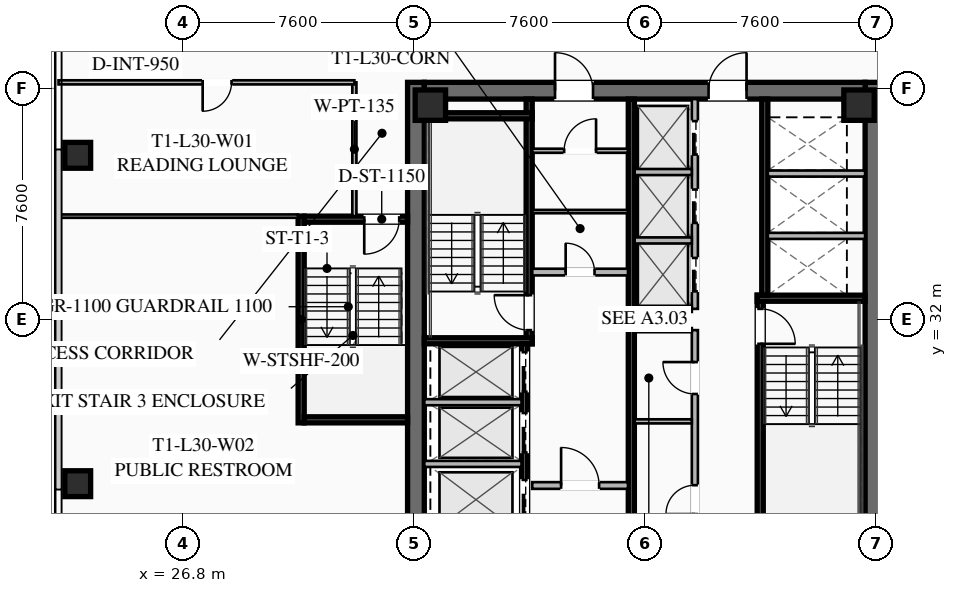
"""IFC4 building model, lengths in metres.
Left out: names, types, materials, properties, quantities, classifications, styles, units other than length and angle.
Written with IfcOpenShell. Run it as: python <this file> out.ifc"""

import sys

from ifc_helpers import new_model, si_unit, direction, frame, frame_2d, origin, origin_2d, place, context, subcontext, project, spatial, rectangle, hollow_rectangle, extrude, element, fill, save


model = new_model("IFC4")
c1 = context("Model", 3, precision=1e-05, world=origin(), true_north=direction((0.0, 1.0)))
c2 = subcontext(c1, "Body", "Model", "MODEL_VIEW")
j1 = project(units=[si_unit("LENGTHUNIT", "METRE"), si_unit("PLANEANGLEUNIT", "RADIAN")], contexts=[c1])
p1 = place(None, origin())
s1 = spatial("IfcSite", under=j1, at=p1, CompositionType="ELEMENT")
p2 = place(p1, origin())
s2 = spatial("IfcBuilding", under=s1, at=p2, CompositionType="ELEMENT")
p3 = place(p2, frame((0.0, 0.0, 114.4)))
s3 = spatial("IfcBuildingStorey", under=s2, at=p3, CompositionType="ELEMENT", Elevation=114.4)
for number, where, z_axis, x_axis in (
    (1, (34.475, 24.2, 0.0), (0.0, 0.0, 1.0), (0.0, 1.0, 0.0)),
    (2, (49.525, 39.8, 0.0), (0.0, 0.0, 1.0), (0.0, -1.0, 0.0)),
):
    element("IfcWall", number, at=place(p3, frame(where, z_axis=z_axis, x_axis=x_axis)), inside=s3, PredefinedType="SHEAR", context=c2, shape_type="SweptSolid", body=[
        extrude(rectangle(XDim=15.6, YDim=0.55, at=frame_2d((7.8, 0.0))), origin(), (0.0, 0.0, 1.0), 3.55),
    ])
p4 = place(p3, frame((34.75, 39.525, 0.0), z_axis=(0.0, 0.0, 1.0), x_axis=(1.0, 0.0, 0.0)))
e3 = element("IfcWall", 3, at=p4, inside=s3, PredefinedType="SHEAR", context=c2, shape_type="SweptSolid", body=[
    extrude(rectangle(XDim=14.5, YDim=0.55, at=frame_2d((7.25, 0.0))), origin(), (0.0, 0.0, 1.0), 3.55),
])
p5 = place(p4, frame((4.3, 0.0, 0.0)))
e4 = element("IfcOpeningElement", 4, at=p5, cuts=e3, PredefinedType="OPENING", context=c2, shape_type="SweptSolid", body=[
    extrude(rectangle(XDim=1.25, YDim=2.25, at=frame_2d((0.625, 1.125))), frame((0.0, 0.285, 0.0), z_axis=(0.0, -1.0, 0.0), x_axis=(1.0, 0.0, 0.0)), (0.0, 0.0, 1.0), 0.57),
])
p6 = place(p4, frame((9.35, 0.0, 0.0)))
e5 = element("IfcOpeningElement", 5, at=p6, cuts=e3, PredefinedType="OPENING", context=c2, shape_type="SweptSolid", body=[
    extrude(rectangle(XDim=1.25, YDim=2.25, at=frame_2d((0.625, 1.125))), frame((0.0, 0.285, 0.0), z_axis=(0.0, -1.0, 0.0), x_axis=(1.0, 0.0, 0.0)), (0.0, 0.0, 1.0), 0.57),
])
for number, where, z_axis, x_axis in (
    (6, (49.05, 39.05, 0.0), (0.0, 0.0, 1.0), (1.0, 0.0, 0.0)),
    (7, (34.95, 39.05, 0.0), (0.0, 0.0, 1.0), (1.0, 0.0, 0.0)),
):
    element("IfcColumn", number, at=place(p3, frame(where, z_axis=z_axis, x_axis=x_axis)), inside=s3, PredefinedType="COLUMN", context=c2, shape_type="SweptSolid", body=[
        extrude(hollow_rectangle(XDim=1.0, YDim=1.0, WallThickness=0.04, at=origin_2d()), origin(), (0.0, 0.0, 1.0), 3.37),
    ])
for number, where, z_axis, x_axis in (
    (8, (23.35, 37.4, 0.0), (0.0, 0.0, 1.0), (1.0, 0.0, 0.0)),
    (9, (23.35, 26.6, 0.0), (0.0, 0.0, 1.0), (1.0, 0.0, 0.0)),
):
    element("IfcColumn", number, at=place(p3, frame(where, z_axis=z_axis, x_axis=x_axis)), inside=s3, PredefinedType="COLUMN", context=c2, shape_type="SweptSolid", body=[
        extrude(hollow_rectangle(XDim=0.85, YDim=0.85, WallThickness=0.035, at=origin_2d()), origin(), (0.0, 0.0, 1.0), 3.37),
    ])
p7 = place(p3, frame((38.2, 31.2, 0.0), z_axis=(0.0, 0.0, 1.0), x_axis=(0.0, 1.0, 0.0)))
e10 = element("IfcWall", 10, at=p7, inside=s3, PredefinedType="SHEAR", context=c2, shape_type="SweptSolid", body=[
    extrude(rectangle(XDim=8.05, YDim=0.2, at=frame_2d((4.025, 0.0))), origin(), (0.0, 0.0, 1.0), 3.37),
])
p8 = place(p7, frame((0.45, 0.0, 0.0)))
e11 = element("IfcOpeningElement", 11, at=p8, cuts=e10, PredefinedType="OPENING", context=c2, shape_type="SweptSolid", body=[
    extrude(rectangle(XDim=1.15, YDim=2.2, at=frame_2d((0.575, 1.1))), frame((0.0, 0.11, 0.0), z_axis=(0.0, -1.0, 0.0), x_axis=(1.0, 0.0, 0.0)), (0.0, 0.0, 1.0), 0.22),
])
for number, where, z_axis, x_axis in (
    (12, (34.75, 31.3, 0.0), (0.0, 0.0, 1.0), (1.0, 0.0, 0.0)),
    (13, (34.75, 38.7, 0.0), (0.0, 0.0, 1.0), (1.0, 0.0, 0.0)),
):
    element("IfcWall", number, at=place(p3, frame(where, z_axis=z_axis, x_axis=x_axis)), inside=s3, PredefinedType="SHEAR", context=c2, shape_type="SweptSolid", body=[
        extrude(rectangle(XDim=3.55, YDim=0.2, at=frame_2d((1.775, 0.0))), origin(), (0.0, 0.0, 1.0), 3.37),
    ])
p9 = place(p3, frame((45.8, 32.8, 0.0), z_axis=(0.0, 0.0, 1.0), x_axis=(0.0, -1.0, 0.0)))
e14 = element("IfcWall", 14, at=p9, inside=s3, PredefinedType="SHEAR", context=c2, shape_type="SweptSolid", body=[
    extrude(rectangle(XDim=8.05, YDim=0.2, at=frame_2d((4.025, 0.0))), origin(), (0.0, 0.0, 1.0), 3.37),
])
p10 = place(p9, frame((0.45, 0.0, 0.0)))
e15 = element("IfcOpeningElement", 15, at=p10, cuts=e14, PredefinedType="OPENING", context=c2, shape_type="SweptSolid", body=[
    extrude(rectangle(XDim=1.15, YDim=2.2, at=frame_2d((0.575, 1.1))), frame((0.0, 0.11, 0.0), z_axis=(0.0, -1.0, 0.0), x_axis=(1.0, 0.0, 0.0)), (0.0, 0.0, 1.0), 0.22),
])
p11 = place(p3, frame((45.7, 32.7, 0.0), z_axis=(0.0, 0.0, 1.0), x_axis=(1.0, 0.0, 0.0)))
e16 = element("IfcWall", 16, at=p11, inside=s3, PredefinedType="SHEAR", context=c2, shape_type="SweptSolid", body=[
    extrude(rectangle(XDim=3.55, YDim=0.2, at=frame_2d((1.775, 0.0))), origin(), (0.0, 0.0, 1.0), 3.37),
])
p12 = place(p3, frame((41.56, 24.75, 0.0), z_axis=(0.0, 0.0, 1.0), x_axis=(0.0, 1.0, 0.0)))
e17 = element("IfcWall", 17, at=p12, inside=s3, PredefinedType="SHEAR", context=c2, shape_type="SweptSolid", body=[
    extrude(rectangle(XDim=14.5, YDim=0.2, at=frame_2d((7.25, 0.0))), origin(), (0.0, 0.0, 1.0), 3.37),
])
p13 = place(p3, frame((38.3, 33.56, 0.0), z_axis=(0.0, 0.0, 1.0), x_axis=(1.0, 0.0, 0.0)))
e18 = element("IfcWall", 18, at=p13, inside=s3, PredefinedType="SOLIDWALL", context=c2, shape_type="SweptSolid", body=[
    extrude(rectangle(XDim=3.15, YDim=0.22, at=frame_2d((1.575, 0.0))), origin(), (0.0, 0.0, 1.0), 2.723),
])
p14 = place(p13, frame((1.1, 0.0, 0.0)))
e19 = element("IfcOpeningElement", 19, at=p14, cuts=e18, PredefinedType="OPENING", context=c2, shape_type="SweptSolid", body=[
    extrude(rectangle(XDim=0.95, YDim=2.05, at=frame_2d((0.475, 1.025))), frame((0.0, 0.12, 0.0), z_axis=(0.0, -1.0, 0.0), x_axis=(1.0, 0.0, 0.0)), (0.0, 0.0, 1.0), 0.24),
])
p15 = place(p3, frame((38.3, 26.54, 0.0), z_axis=(0.0, 0.0, 1.0), x_axis=(1.0, 0.0, 0.0)))
e20 = element("IfcWall", 20, at=p15, inside=s3, PredefinedType="SOLIDWALL", context=c2, shape_type="SweptSolid", body=[
    extrude(rectangle(XDim=3.15, YDim=0.22, at=frame_2d((1.575, 0.0))), origin(), (0.0, 0.0, 1.0), 2.723),
])
p16 = place(p15, frame((0.95, 0.0, 0.0)))
e21 = element("IfcOpeningElement", 21, at=p16, cuts=e20, PredefinedType="OPENING", context=c2, shape_type="SweptSolid", body=[
    extrude(rectangle(XDim=1.25, YDim=2.25, at=frame_2d((0.625, 1.125))), frame((0.0, 0.12, 0.0), z_axis=(0.0, -1.0, 0.0), x_axis=(1.0, 0.0, 0.0)), (0.0, 0.0, 1.0), 0.24),
])
p17 = place(p3, frame((38.05, 24.75, 0.0), z_axis=(0.0, 0.0, 1.0), x_axis=(0.0, 1.0, 0.0)))
e22 = element("IfcWall", 22, at=p17, inside=s3, PredefinedType="SHEAR", context=c2, shape_type="SweptSolid", body=[
    extrude(rectangle(XDim=6.45, YDim=0.2, at=frame_2d((3.225, 0.0))), origin(), (0.0, 0.0, 1.0), 3.37),
])
p18 = place(p17, frame((4.875, 0.0, 0.0)))
e23 = element("IfcOpeningElement", 23, at=p18, cuts=e22, PredefinedType="OPENING", context=c2, shape_type="SweptSolid", body=[
    extrude(rectangle(XDim=1.3, YDim=2.25, at=frame_2d((0.65, 1.125))), frame((0.0, 0.11, 0.0), z_axis=(0.0, -1.0, 0.0), x_axis=(1.0, 0.0, 0.0)), (0.0, 0.0, 1.0), 0.22),
])
p19 = place(p17, frame((2.875, 0.0, 0.0)))
e24 = element("IfcOpeningElement", 24, at=p19, cuts=e22, PredefinedType="OPENING", context=c2, shape_type="SweptSolid", body=[
    extrude(rectangle(XDim=1.3, YDim=2.25, at=frame_2d((0.65, 1.125))), frame((0.0, 0.11, 0.0), z_axis=(0.0, -1.0, 0.0), x_axis=(1.0, 0.0, 0.0)), (0.0, 0.0, 1.0), 0.22),
])
p20 = place(p17, frame((0.675, 0.0, 0.0)))
e25 = element("IfcOpeningElement", 25, at=p20, cuts=e22, PredefinedType="OPENING", context=c2, shape_type="SweptSolid", body=[
    extrude(rectangle(XDim=1.3, YDim=2.25, at=frame_2d((0.65, 1.125))), frame((0.0, 0.11, 0.0), z_axis=(0.0, -1.0, 0.0), x_axis=(1.0, 0.0, 0.0)), (0.0, 0.0, 1.0), 0.22),
])
for number, where, z_axis, x_axis in (
    (26, (34.75, 27.25, 0.0), (0.0, 0.0, 1.0), (1.0, 0.0, 0.0)),
    (27, (34.75, 29.28, 0.0), (0.0, 0.0, 1.0), (1.0, 0.0, 0.0)),
):
    element("IfcWall", number, at=place(p3, frame(where, z_axis=z_axis, x_axis=x_axis)), inside=s3, PredefinedType="SOLIDWALL", context=c2, shape_type="SweptSolid", body=[
        extrude(rectangle(XDim=3.2, YDim=0.2, at=frame_2d((1.6, 0.0))), origin(), (0.0, 0.0, 1.0), 3.37),
    ])
p21 = place(p3, frame((45.95, 39.25, 0.0), z_axis=(0.0, 0.0, 1.0), x_axis=(0.0, -1.0, 0.0)))
e28 = element("IfcWall", 28, at=p21, inside=s3, PredefinedType="SHEAR", context=c2, shape_type="SweptSolid", body=[
    extrude(rectangle(XDim=6.45, YDim=0.2, at=frame_2d((3.225, 0.0))), origin(), (0.0, 0.0, 1.0), 3.37),
])
for number, where, z_axis, x_axis in (
    (29, (46.05, 34.75, 0.0), (0.0, 0.0, 1.0), (1.0, 0.0, 0.0)),
    (30, (46.05, 36.8, 0.0), (0.0, 0.0, 1.0), (1.0, 0.0, 0.0)),
):
    element("IfcWall", number, at=place(p3, frame(where, z_axis=z_axis, x_axis=x_axis)), inside=s3, PredefinedType="SOLIDWALL", context=c2, shape_type="SweptSolid", body=[
        extrude(rectangle(XDim=3.2, YDim=0.2, at=frame_2d((1.6, 0.0))), origin(), (0.0, 0.0, 1.0), 3.37),
    ])
p22 = place(p3, frame((38.3, 37.55, 0.0), z_axis=(0.0, 0.0, 1.0), x_axis=(1.0, 0.0, 0.0)))
e31 = element("IfcWall", 31, at=p22, inside=s3, PredefinedType="PARTITIONING", context=c2, shape_type="SweptSolid", body=[
    extrude(rectangle(XDim=3.15, YDim=0.135, at=frame_2d((1.575, 0.0))), origin(), (0.0, 0.0, 1.0), 2.723),
])
p23 = place(p22, frame((1.05, 0.0, 0.0)))
e32 = element("IfcOpeningElement", 32, at=p23, cuts=e31, PredefinedType="OPENING", context=c2, shape_type="SweptSolid", body=[
    extrude(rectangle(XDim=1.05, YDim=2.2, at=frame_2d((0.525, 1.1))), frame((0.0, 0.077, 0.0), z_axis=(0.0, -1.0, 0.0), x_axis=(1.0, 0.0, 0.0)), (0.0, 0.0, 1.0), 0.155),
])
p24 = place(p3, frame((38.3, 35.55, 0.0), z_axis=(0.0, 0.0, 1.0), x_axis=(1.0, 0.0, 0.0)))
e33 = element("IfcWall", 33, at=p24, inside=s3, PredefinedType="PARTITIONING", context=c2, shape_type="SweptSolid", body=[
    extrude(rectangle(XDim=3.15, YDim=0.11, at=frame_2d((1.575, 0.0))), origin(), (0.0, 0.0, 1.0), 2.723),
])
p25 = place(p3, frame((43.65, 24.75, 0.0), z_axis=(0.0, 0.0, 1.0), x_axis=(0.0, 1.0, 0.0)))
e34 = element("IfcWall", 34, at=p25, inside=s3, PredefinedType="SOLIDWALL", context=c2, shape_type="SweptSolid", body=[
    extrude(rectangle(XDim=6.9, YDim=0.2, at=frame_2d((3.45, 0.0))), origin(), (0.0, 0.0, 1.0), 2.723),
])
p26 = place(p25, frame((0.85, 0.0, 0.0)))
e35 = element("IfcOpeningElement", 35, at=p26, cuts=e34, PredefinedType="OPENING", context=c2, shape_type="SweptSolid", body=[
    extrude(rectangle(XDim=0.95, YDim=2.05, at=frame_2d((0.475, 1.025))), frame((0.0, 0.11, 0.0), z_axis=(0.0, -1.0, 0.0), x_axis=(1.0, 0.0, 0.0)), (0.0, 0.0, 1.0), 0.22),
])
p27 = place(p25, frame((4.8, 0.0, 0.0)))
e36 = element("IfcOpeningElement", 36, at=p27, cuts=e34, PredefinedType="OPENING", context=c2, shape_type="SweptSolid", body=[
    extrude(rectangle(XDim=1.05, YDim=2.2, at=frame_2d((0.525, 1.1))), frame((0.0, 0.11, 0.0), z_axis=(0.0, -1.0, 0.0), x_axis=(1.0, 0.0, 0.0)), (0.0, 0.0, 1.0), 0.22),
])
for number, where, z_axis, x_axis in (
    (37, (41.67, 31.65, 0.0), (0.0, 0.0, 1.0), (1.0, 0.0, 0.0)),
    (38, (41.67, 28.65, 0.0), (0.0, 0.0, 1.0), (1.0, 0.0, 0.0)),
):
    element("IfcWall", number, at=place(p3, frame(where, z_axis=z_axis, x_axis=x_axis)), inside=s3, PredefinedType="PARTITIONING", context=c2, shape_type="SweptSolid", body=[
        extrude(rectangle(XDim=1.88, YDim=0.135, at=frame_2d((0.94, 0.0))), origin(), (0.0, 0.0, 1.0), 2.723),
    ])
p28 = place(p3, frame((43.65, 32.35, 0.0), z_axis=(0.0, 0.0, 1.0), x_axis=(0.0, 1.0, 0.0)))
e39 = element("IfcWall", 39, at=p28, inside=s3, PredefinedType="SOLIDWALL", context=c2, shape_type="SweptSolid", body=[
    extrude(rectangle(XDim=6.9, YDim=0.2, at=frame_2d((3.45, 0.0))), origin(), (0.0, 0.0, 1.0), 3.37),
])
p29 = place(p28, frame((0.575, 0.0, 0.0)))
e40 = element("IfcOpeningElement", 40, at=p29, cuts=e39, PredefinedType="OPENING", context=c2, shape_type="SweptSolid", body=[
    extrude(rectangle(XDim=1.1, YDim=2.2, at=frame_2d((0.55, 1.1))), frame((0.0, 0.11, 0.0), z_axis=(0.0, -1.0, 0.0), x_axis=(1.0, 0.0, 0.0)), (0.0, 0.0, 1.0), 0.22),
])
p30 = place(p28, frame((2.825, 0.0, 0.0)))
e41 = element("IfcOpeningElement", 41, at=p30, cuts=e39, PredefinedType="OPENING", context=c2, shape_type="SweptSolid", body=[
    extrude(rectangle(XDim=1.1, YDim=2.2, at=frame_2d((0.55, 1.1))), frame((0.0, 0.11, 0.0), z_axis=(0.0, -1.0, 0.0), x_axis=(1.0, 0.0, 0.0)), (0.0, 0.0, 1.0), 0.22),
])
p31 = place(p28, frame((5.075, 0.0, 0.0)))
e42 = element("IfcOpeningElement", 42, at=p31, cuts=e39, PredefinedType="OPENING", context=c2, shape_type="SweptSolid", body=[
    extrude(rectangle(XDim=1.1, YDim=2.2, at=frame_2d((0.55, 1.1))), frame((0.0, 0.11, 0.0), z_axis=(0.0, -1.0, 0.0), x_axis=(1.0, 0.0, 0.0)), (0.0, 0.0, 1.0), 0.22),
])
for number, where, z_axis, x_axis in (
    (43, (41.67, 32.35, 0.0), (0.0, 0.0, 1.0), (1.0, 0.0, 0.0)),
    (44, (41.67, 34.6, 0.0), (0.0, 0.0, 1.0), (1.0, 0.0, 0.0)),
    (45, (41.67, 36.85, 0.0), (0.0, 0.0, 1.0), (1.0, 0.0, 0.0)),
):
    element("IfcWall", number, at=place(p3, frame(where, z_axis=z_axis, x_axis=x_axis)), inside=s3, PredefinedType="SOLIDWALL", context=c2, shape_type="SweptSolid", body=[
        extrude(rectangle(XDim=1.88, YDim=0.2, at=frame_2d((0.94, 0.0))), origin(), (0.0, 0.0, 1.0), 3.37),
    ])
p32 = place(p3, frame((30.7, 28.6, 0.0), z_axis=(0.0, 0.0, 1.0), x_axis=(0.0, 1.0, 0.0)))
e46 = element("IfcWall", 46, at=p32, inside=s3, PredefinedType="SHEAR", context=c2, shape_type="SweptSolid", body=[
    extrude(rectangle(XDim=6.8, YDim=0.2, at=frame_2d((3.4, 0.0))), origin(), (0.0, 0.0, 1.0), 3.37),
])
p33 = place(p3, frame((34.2, 35.3, 0.0), z_axis=(0.0, 0.0, 1.0), x_axis=(-1.0, 0.0, 0.0)))
e47 = element("IfcWall", 47, at=p33, inside=s3, PredefinedType="SHEAR", context=c2, shape_type="SweptSolid", body=[
    extrude(rectangle(XDim=3.4, YDim=0.2, at=frame_2d((1.7, 0.0))), origin(), (0.0, 0.0, 1.0), 3.37),
])
p34 = place(p33, frame((0.275, 0.0, 0.0)))
e48 = element("IfcOpeningElement", 48, at=p34, cuts=e47, PredefinedType="OPENING", context=c2, shape_type="SweptSolid", body=[
    extrude(rectangle(XDim=1.15, YDim=2.2, at=frame_2d((0.575, 1.1))), frame((0.0, 0.11, 0.0), z_axis=(0.0, -1.0, 0.0), x_axis=(1.0, 0.0, 0.0)), (0.0, 0.0, 1.0), 0.22),
])
p35 = place(p3, frame((30.8, 28.7, 0.0), z_axis=(0.0, 0.0, 1.0), x_axis=(1.0, 0.0, 0.0)))
e49 = element("IfcWall", 49, at=p35, inside=s3, PredefinedType="SHEAR", context=c2, shape_type="SweptSolid", body=[
    extrude(rectangle(XDim=3.4, YDim=0.2, at=frame_2d((1.7, 0.0))), origin(), (0.0, 0.0, 1.0), 3.37),
])
p36 = place(p3, frame((32.45, 35.4, 0.0), z_axis=(0.0, 0.0, 1.0), x_axis=(0.0, 1.0, 0.0)))
e50 = element("IfcWall", 50, at=p36, inside=s3, PredefinedType="PARTITIONING", context=c2, shape_type="SweptSolid", body=[
    extrude(rectangle(XDim=4.4, YDim=0.135, at=frame_2d((2.2, 0.0))), origin(), (0.0, 0.0, 1.0), 2.723),
])
p37 = place(p3, frame((32.45, 39.8, 0.0), z_axis=(0.0, 0.0, 1.0), x_axis=(-1.0, 0.0, 0.0)))
e51 = element("IfcWall", 51, at=p37, inside=s3, PredefinedType="PARTITIONING", context=c2, shape_type="SweptSolid", body=[
    extrude(rectangle(XDim=9.73, YDim=0.135, at=frame_2d((4.865, 0.0))), origin(), (0.0, 0.0, 1.0), 2.723),
])
p38 = place(p37, frame((4.04, 0.0, 0.0)))
e52 = element("IfcOpeningElement", 52, at=p38, cuts=e51, PredefinedType="OPENING", context=c2, shape_type="SweptSolid", body=[
    extrude(rectangle(XDim=0.95, YDim=2.05, at=frame_2d((0.475, 1.025))), frame((0.0, 0.077, 0.0), z_axis=(0.0, -1.0, 0.0), x_axis=(1.0, 0.0, 0.0)), (0.0, 0.0, 1.0), 0.155),
])
p39 = place(p3, frame((30.6, 35.4, 0.0), z_axis=(0.0, 0.0, 1.0), x_axis=(-1.0, 0.0, 0.0)))
e53 = element("IfcWall", 53, at=p39, inside=s3, PredefinedType="PARTITIONING", context=c2, shape_type="SweptSolid", body=[
    extrude(rectangle(XDim=7.88, YDim=0.11, at=frame_2d((3.94, 0.0))), origin(), (0.0, 0.0, 1.0), 2.723),
])
p40 = place(p5, origin())
e54 = element("IfcDoor", 54, at=p40, inside=s3, OperationType="SINGLE_SWING_LEFT", PredefinedType="DOOR", context=c2, shape_type="SweptSolid", body=[
    extrude(rectangle(XDim=1.25, YDim=2.25, at=frame_2d((0.625, 1.125))), frame((0.0, 0.025, 0.0), z_axis=(0.0, -1.0, 0.0), x_axis=(1.0, 0.0, 0.0)), (0.0, 0.0, 1.0), 0.05),
])
fill(e4, e54)
p41 = place(p6, origin())
e55 = element("IfcDoor", 55, at=p41, inside=s3, OperationType="SINGLE_SWING_RIGHT", PredefinedType="DOOR", context=c2, shape_type="SweptSolid", body=[
    extrude(rectangle(XDim=1.25, YDim=2.25, at=frame_2d((0.625, 1.125))), frame((0.0, 0.025, 0.0), z_axis=(0.0, -1.0, 0.0), x_axis=(1.0, 0.0, 0.0)), (0.0, 0.0, 1.0), 0.05),
])
fill(e5, e55)
p42 = place(p8, origin())
e56 = element("IfcDoor", 56, at=p42, inside=s3, OperationType="SINGLE_SWING_RIGHT", PredefinedType="DOOR", context=c2, shape_type="SweptSolid", body=[
    extrude(rectangle(XDim=1.15, YDim=2.2, at=frame_2d((0.575, 1.1))), frame((0.0, 0.025, 0.0), z_axis=(0.0, -1.0, 0.0), x_axis=(1.0, 0.0, 0.0)), (0.0, 0.0, 1.0), 0.05),
])
fill(e11, e56)
p43 = place(p10, origin())
e57 = element("IfcDoor", 57, at=p43, inside=s3, OperationType="SINGLE_SWING_RIGHT", PredefinedType="DOOR", context=c2, shape_type="SweptSolid", body=[
    extrude(rectangle(XDim=1.15, YDim=2.2, at=frame_2d((0.575, 1.1))), frame((0.0, 0.025, 0.0), z_axis=(0.0, -1.0, 0.0), x_axis=(1.0, 0.0, 0.0)), (0.0, 0.0, 1.0), 0.05),
])
fill(e15, e57)
p44 = place(p16, origin())
e58 = element("IfcDoor", 58, at=p44, inside=s3, OperationType="SINGLE_SWING_LEFT", PredefinedType="DOOR", context=c2, shape_type="SweptSolid", body=[
    extrude(rectangle(XDim=1.25, YDim=2.25, at=frame_2d((0.625, 1.125))), frame((0.0, 0.025, 0.0), z_axis=(0.0, -1.0, 0.0), x_axis=(1.0, 0.0, 0.0)), (0.0, 0.0, 1.0), 0.05),
])
fill(e21, e58)
p45 = place(p23, origin())
e59 = element("IfcDoor", 59, at=p45, inside=s3, OperationType="SINGLE_SWING_RIGHT", PredefinedType="DOOR", context=c2, shape_type="SweptSolid", body=[
    extrude(rectangle(XDim=1.05, YDim=2.2, at=frame_2d((0.525, 1.1))), frame((0.0, 0.025, 0.0), z_axis=(0.0, -1.0, 0.0), x_axis=(1.0, 0.0, 0.0)), (0.0, 0.0, 1.0), 0.05),
])
fill(e32, e59)
p46 = place(p14, origin())
e60 = element("IfcDoor", 60, at=p46, inside=s3, OperationType="SINGLE_SWING_LEFT", PredefinedType="DOOR", context=c2, shape_type="SweptSolid", body=[
    extrude(rectangle(XDim=0.95, YDim=2.05, at=frame_2d((0.475, 1.025))), frame((0.0, 0.025, 0.0), z_axis=(0.0, -1.0, 0.0), x_axis=(1.0, 0.0, 0.0)), (0.0, 0.0, 1.0), 0.05),
])
fill(e19, e60)
p47 = place(p26, origin())
e61 = element("IfcDoor", 61, at=p47, inside=s3, OperationType="SINGLE_SWING_LEFT", PredefinedType="DOOR", context=c2, shape_type="SweptSolid", body=[
    extrude(rectangle(XDim=0.95, YDim=2.05, at=frame_2d((0.475, 1.025))), frame((0.0, 0.025, 0.0), z_axis=(0.0, -1.0, 0.0), x_axis=(1.0, 0.0, 0.0)), (0.0, 0.0, 1.0), 0.05),
])
fill(e35, e61)
p48 = place(p27, origin())
e62 = element("IfcDoor", 62, at=p48, inside=s3, OperationType="SINGLE_SWING_RIGHT", PredefinedType="DOOR", context=c2, shape_type="SweptSolid", body=[
    extrude(rectangle(XDim=1.05, YDim=2.2, at=frame_2d((0.525, 1.1))), frame((0.0, 0.025, 0.0), z_axis=(0.0, -1.0, 0.0), x_axis=(1.0, 0.0, 0.0)), (0.0, 0.0, 1.0), 0.05),
])
fill(e36, e62)
p49 = place(p34, origin())
e63 = element("IfcDoor", 63, at=p49, inside=s3, OperationType="SINGLE_SWING_RIGHT", PredefinedType="DOOR", context=c2, shape_type="SweptSolid", body=[
    extrude(rectangle(XDim=1.15, YDim=2.2, at=frame_2d((0.575, 1.1))), frame((0.0, 0.025, 0.0), z_axis=(0.0, -1.0, 0.0), x_axis=(1.0, 0.0, 0.0)), (0.0, 0.0, 1.0), 0.05),
])
fill(e48, e63)
p50 = place(p38, origin())
e64 = element("IfcDoor", 64, at=p50, inside=s3, OperationType="SINGLE_SWING_RIGHT", PredefinedType="DOOR", context=c2, shape_type="SweptSolid", body=[
    extrude(rectangle(XDim=0.95, YDim=2.05, at=frame_2d((0.475, 1.025))), frame((0.0, 0.025, 0.0), z_axis=(0.0, -1.0, 0.0), x_axis=(1.0, 0.0, 0.0)), (0.0, 0.0, 1.0), 0.05),
])
fill(e52, e64)
p51 = place(p18, origin())
e65 = element("IfcDoor", 65, at=p51, inside=s3, OperationType="SLIDING_TO_LEFT", PredefinedType="DOOR", context=c2, shape_type="SweptSolid", body=[
    extrude(rectangle(XDim=1.3, YDim=2.25, at=frame_2d((0.65, 1.125))), frame((0.0, 0.025, 0.0), z_axis=(0.0, -1.0, 0.0), x_axis=(1.0, 0.0, 0.0)), (0.0, 0.0, 1.0), 0.05),
])
fill(e23, e65)
p52 = place(p19, origin())
e66 = element("IfcDoor", 66, at=p52, inside=s3, OperationType="SLIDING_TO_LEFT", PredefinedType="DOOR", context=c2, shape_type="SweptSolid", body=[
    extrude(rectangle(XDim=1.3, YDim=2.25, at=frame_2d((0.65, 1.125))), frame((0.0, 0.025, 0.0), z_axis=(0.0, -1.0, 0.0), x_axis=(1.0, 0.0, 0.0)), (0.0, 0.0, 1.0), 0.05),
])
fill(e24, e66)
p53 = place(p20, origin())
e67 = element("IfcDoor", 67, at=p53, inside=s3, OperationType="SLIDING_TO_LEFT", PredefinedType="DOOR", context=c2, shape_type="SweptSolid", body=[
    extrude(rectangle(XDim=1.3, YDim=2.25, at=frame_2d((0.65, 1.125))), frame((0.0, 0.025, 0.0), z_axis=(0.0, -1.0, 0.0), x_axis=(1.0, 0.0, 0.0)), (0.0, 0.0, 1.0), 0.05),
])
fill(e25, e67)
p54 = place(p29, origin())
e68 = element("IfcDoor", 68, at=p54, inside=s3, OperationType="SLIDING_TO_LEFT", PredefinedType="DOOR", context=c2, shape_type="SweptSolid", body=[
    extrude(rectangle(XDim=1.1, YDim=2.2, at=frame_2d((0.55, 1.1))), frame((0.0, 0.025, 0.0), z_axis=(0.0, -1.0, 0.0), x_axis=(1.0, 0.0, 0.0)), (0.0, 0.0, 1.0), 0.05),
])
fill(e40, e68)
p55 = place(p30, origin())
e69 = element("IfcDoor", 69, at=p55, inside=s3, OperationType="SLIDING_TO_LEFT", PredefinedType="DOOR", context=c2, shape_type="SweptSolid", body=[
    extrude(rectangle(XDim=1.1, YDim=2.2, at=frame_2d((0.55, 1.1))), frame((0.0, 0.025, 0.0), z_axis=(0.0, -1.0, 0.0), x_axis=(1.0, 0.0, 0.0)), (0.0, 0.0, 1.0), 0.05),
])
fill(e41, e69)
p56 = place(p31, origin())
e70 = element("IfcDoor", 70, at=p56, inside=s3, OperationType="SLIDING_TO_LEFT", PredefinedType="DOOR", context=c2, shape_type="SweptSolid", body=[
    extrude(rectangle(XDim=1.1, YDim=2.2, at=frame_2d((0.55, 1.1))), frame((0.0, 0.025, 0.0), z_axis=(0.0, -1.0, 0.0), x_axis=(1.0, 0.0, 0.0)), (0.0, 0.0, 1.0), 0.05),
])
fill(e42, e70)
save(model, sys.argv[1])
